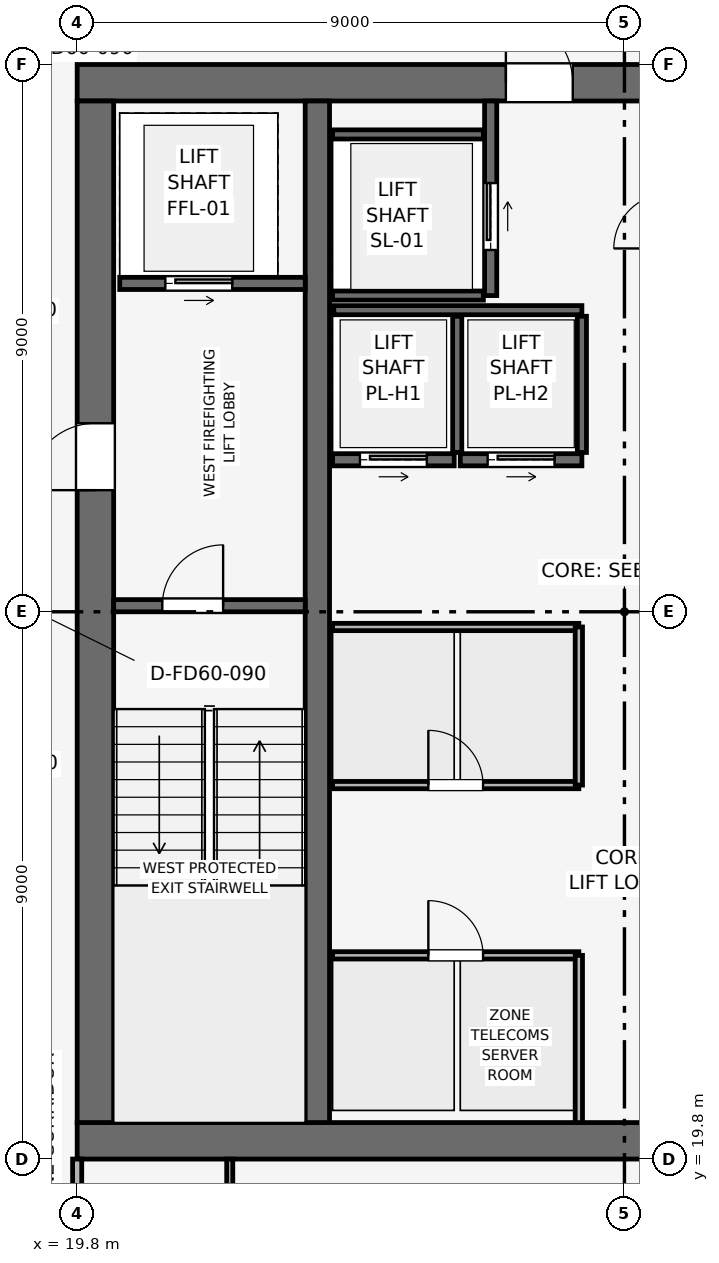
"""IFC4 building model, lengths in metres.
Left out: names, types, materials, properties, quantities, classifications, styles, units other than length and angle.
Written with IfcOpenShell. Run it as: python <this file> out.ifc"""

import sys

from ifc_helpers import new_model, si_unit, direction, frame, frame_2d, origin, place, context, subcontext, project, spatial, rectangle, extrude, element, fill, save


model = new_model("IFC4")
c1 = context("Model", 3, precision=1e-05, world=origin(), true_north=direction((0.0, 1.0)))
c2 = subcontext(c1, "Body", "Model", "MODEL_VIEW")
j1 = project(units=[si_unit("LENGTHUNIT", "METRE"), si_unit("PLANEANGLEUNIT", "RADIAN")], contexts=[c1])
p1 = place(None, origin())
s1 = spatial("IfcSite", under=j1, at=p1, CompositionType="ELEMENT")
p2 = place(p1, origin())
s2 = spatial("IfcBuilding", under=s1, at=p2, CompositionType="ELEMENT")
p3 = place(p2, frame((0.0, 0.0, 321.75)))
s3 = spatial("IfcBuildingStorey", under=s2, at=p3, CompositionType="ELEMENT", Elevation=321.75)
p4 = place(p3, frame((19.8, 20.1, 0.0), z_axis=(0.0, 0.0, 1.0), x_axis=(1.0, 0.0, 0.0)))
e1 = element("IfcWall", 1, at=p4, inside=s3, PredefinedType="SHEAR", context=c2, shape_type="SweptSolid", body=[
    extrude(rectangle(XDim=18.0, YDim=0.6, at=frame_2d((9.0, 0.0))), origin(), (0.0, 0.0, 1.0), 3.75),
])
p5 = place(p3, frame((19.8, 37.5, 0.0), z_axis=(0.0, 0.0, 1.0), x_axis=(1.0, 0.0, 0.0)))
e2 = element("IfcWall", 2, at=p5, inside=s3, PredefinedType="SHEAR", context=c2, shape_type="SweptSolid", body=[
    extrude(rectangle(XDim=18.0, YDim=0.6, at=frame_2d((9.0, 0.0))), origin(), (0.0, 0.0, 1.0), 3.75),
])
p6 = place(p5, frame((7.05, 0.0, 0.0)))
e3 = element("IfcOpeningElement", 3, at=p6, cuts=e2, PredefinedType="OPENING", context=c2, shape_type="SweptSolid", body=[
    extrude(rectangle(XDim=1.1, YDim=2.15, at=frame_2d((0.55, 1.075))), frame((0.0, 0.31, 0.0), z_axis=(0.0, -1.0, 0.0), x_axis=(1.0, 0.0, 0.0)), (0.0, 0.0, 1.0), 0.62),
])
p7 = place(p3, frame((20.1, 20.4, 0.0), z_axis=(0.0, 0.0, 1.0), x_axis=(0.0, 1.0, 0.0)))
e4 = element("IfcWall", 4, at=p7, inside=s3, PredefinedType="SHEAR", context=c2, shape_type="SweptSolid", body=[
    extrude(rectangle(XDim=16.8, YDim=0.6, at=frame_2d((8.4, 0.0))), origin(), (0.0, 0.0, 1.0), 3.75),
])
p8 = place(p7, frame((10.4, 0.0, 0.0)))
e5 = element("IfcOpeningElement", 5, at=p8, cuts=e4, PredefinedType="OPENING", context=c2, shape_type="SweptSolid", body=[
    extrude(rectangle(XDim=1.1, YDim=2.15, at=frame_2d((0.55, 1.075))), frame((0.0, 0.31, 0.0), z_axis=(0.0, -1.0, 0.0), x_axis=(1.0, 0.0, 0.0)), (0.0, 0.0, 1.0), 0.62),
])
p9 = place(p3, frame((23.75, 20.4, 0.0), z_axis=(0.0, 0.0, 1.0), x_axis=(0.0, 1.0, 0.0)))
e6 = element("IfcWall", 6, at=p9, inside=s3, PredefinedType="SHEAR", context=c2, shape_type="SweptSolid", body=[
    extrude(rectangle(XDim=16.8, YDim=0.4, at=frame_2d((8.4, 0.0))), origin(), (0.0, 0.0, 1.0), 3.75),
])
p10 = place(p3, frame((20.4, 28.9, 0.0), z_axis=(0.0, 0.0, 1.0), x_axis=(1.0, 0.0, 0.0)))
e7 = element("IfcWall", 7, at=p10, inside=s3, PredefinedType="SHEAR", context=c2, shape_type="SweptSolid", body=[
    extrude(rectangle(XDim=3.15, YDim=0.2, at=frame_2d((1.575, 0.0))), origin(), (0.0, 0.0, 1.0), 3.51),
])
p11 = place(p10, frame((0.8, 0.0, 0.0)))
e8 = element("IfcOpeningElement", 8, at=p11, cuts=e7, PredefinedType="OPENING", context=c2, shape_type="SweptSolid", body=[
    extrude(rectangle(XDim=1.0, YDim=2.1, at=frame_2d((0.5, 1.05))), frame((0.0, 0.11, 0.0), z_axis=(0.0, -1.0, 0.0), x_axis=(1.0, 0.0, 0.0)), (0.0, 0.0, 1.0), 0.22),
])
p12 = place(p3, frame((20.5, 34.2, 0.0), z_axis=(0.0, 0.0, 1.0), x_axis=(1.0, 0.0, 0.0)))
e9 = element("IfcWall", 9, at=p12, inside=s3, PredefinedType="SHEAR", context=c2, shape_type="SweptSolid", body=[
    extrude(rectangle(XDim=3.05, YDim=0.2, at=frame_2d((1.525, 0.0))), origin(), (0.0, 0.0, 1.0), 3.51),
])
p13 = place(p12, frame((0.75, 0.0, 0.0)))
e10 = element("IfcOpeningElement", 10, at=p13, cuts=e9, PredefinedType="OPENING", context=c2, shape_type="SweptSolid", body=[
    extrude(rectangle(XDim=1.1, YDim=2.15, at=frame_2d((0.55, 1.075))), frame((0.0, 0.11, 0.0), z_axis=(0.0, -1.0, 0.0), x_axis=(1.0, 0.0, 0.0)), (0.0, 0.0, 1.0), 0.22),
])
p14 = place(p3, frame((26.6, 34.0, 0.0), z_axis=(0.0, 0.0, 1.0), x_axis=(0.0, 1.0, 0.0)))
e11 = element("IfcWall", 11, at=p14, inside=s3, PredefinedType="SHEAR", context=c2, shape_type="SweptSolid", body=[
    extrude(rectangle(XDim=3.2, YDim=0.2, at=frame_2d((1.6, 0.0))), origin(), (0.0, 0.0, 1.0), 3.51),
])
p15 = place(p14, frame((0.75, 0.0, 0.0)))
e12 = element("IfcOpeningElement", 12, at=p15, cuts=e11, PredefinedType="OPENING", context=c2, shape_type="SweptSolid", body=[
    extrude(rectangle(XDim=1.1, YDim=2.15, at=frame_2d((0.55, 1.075))), frame((0.0, 0.11, 0.0), z_axis=(0.0, -1.0, 0.0), x_axis=(1.0, 0.0, 0.0)), (0.0, 0.0, 1.0), 0.22),
])
for number, where, z_axis, x_axis in (
    (13, (24.0, 34.0, 0.0), (0.0, 0.0, 1.0), (1.0, 0.0, 0.0)),
    (14, (24.0, 36.65, 0.0), (0.0, 0.0, 1.0), (1.0, 0.0, 0.0)),
):
    element("IfcWall", number, at=place(p3, frame(where, z_axis=z_axis, x_axis=x_axis)), inside=s3, PredefinedType="SHEAR", context=c2, shape_type="SweptSolid", body=[
        extrude(rectangle(XDim=2.48, YDim=0.15, at=frame_2d((1.24, 0.0))), origin(), (0.0, 0.0, 1.0), 3.51),
    ])
p16 = place(p3, frame((24.0, 31.3, 0.0), z_axis=(0.0, 0.0, 1.0), x_axis=(1.0, 0.0, 0.0)))
e15 = element("IfcWall", 15, at=p16, inside=s3, PredefinedType="SHEAR", context=c2, shape_type="SweptSolid", body=[
    extrude(rectangle(XDim=2.0, YDim=0.2, at=frame_2d((1.0, 0.0))), origin(), (0.0, 0.0, 1.0), 3.51),
])
p17 = place(p16, frame((0.45, 0.0, 0.0)))
e16 = element("IfcOpeningElement", 16, at=p17, cuts=e15, PredefinedType="OPENING", context=c2, shape_type="SweptSolid", body=[
    extrude(rectangle(XDim=1.1, YDim=2.15, at=frame_2d((0.55, 1.075))), frame((0.0, 0.11, 0.0), z_axis=(0.0, -1.0, 0.0), x_axis=(1.0, 0.0, 0.0)), (0.0, 0.0, 1.0), 0.22),
])
p18 = place(p3, frame((26.1, 31.3, 0.0), z_axis=(0.0, 0.0, 1.0), x_axis=(1.0, 0.0, 0.0)))
e17 = element("IfcWall", 17, at=p18, inside=s3, PredefinedType="SHEAR", context=c2, shape_type="SweptSolid", body=[
    extrude(rectangle(XDim=2.0, YDim=0.2, at=frame_2d((1.0, 0.0))), origin(), (0.0, 0.0, 1.0), 3.51),
])
p19 = place(p18, frame((0.45, 0.0, 0.0)))
e18 = element("IfcOpeningElement", 18, at=p19, cuts=e17, PredefinedType="OPENING", context=c2, shape_type="SweptSolid", body=[
    extrude(rectangle(XDim=1.1, YDim=2.15, at=frame_2d((0.55, 1.075))), frame((0.0, 0.11, 0.0), z_axis=(0.0, -1.0, 0.0), x_axis=(1.0, 0.0, 0.0)), (0.0, 0.0, 1.0), 0.22),
])
p20 = place(p3, frame((24.02, 33.76, 0.0), z_axis=(0.0, 0.0, 1.0), x_axis=(1.0, 0.0, 0.0)))
e19 = element("IfcWall", 19, at=p20, inside=s3, PredefinedType="SHEAR", context=c2, shape_type="SweptSolid", body=[
    extrude(rectangle(XDim=4.08, YDim=0.15, at=frame_2d((2.04, 0.0))), origin(), (0.0, 0.0, 1.0), 3.51),
])
for number, where, z_axis, x_axis in (
    (20, (26.05, 31.42, 0.0), (0.0, 0.0, 1.0), (0.0, 1.0, 0.0)),
    (21, (28.1, 31.42, 0.0), (0.0, 0.0, 1.0), (0.0, 1.0, 0.0)),
):
    element("IfcWall", number, at=place(p3, frame(where, z_axis=z_axis, x_axis=x_axis)), inside=s3, PredefinedType="SHEAR", context=c2, shape_type="SweptSolid", body=[
        extrude(rectangle(XDim=2.24, YDim=0.15, at=frame_2d((1.12, 0.0))), origin(), (0.0, 0.0, 1.0), 3.51),
    ])
p21 = place(p3, frame((24.0, 23.15, 0.0), z_axis=(0.0, 0.0, 1.0), x_axis=(1.0, 0.0, 0.0)))
e22 = element("IfcWall", 22, at=p21, inside=s3, PredefinedType="PARTITIONING", context=c2, shape_type="SweptSolid", body=[
    extrude(rectangle(XDim=4.05, YDim=0.12, at=frame_2d((2.025, 0.0))), origin(), (0.0, 0.0, 1.0), 3.51),
])
p22 = place(p21, frame((1.575, 0.0, 0.0)))
e23 = element("IfcOpeningElement", 23, at=p22, cuts=e22, PredefinedType="OPENING", context=c2, shape_type="SweptSolid", body=[
    extrude(rectangle(XDim=0.9, YDim=2.1, at=frame_2d((0.45, 1.05))), frame((0.0, 0.07, 0.0), z_axis=(0.0, -1.0, 0.0), x_axis=(1.0, 0.0, 0.0)), (0.0, 0.0, 1.0), 0.14),
])
p23 = place(p3, frame((28.05, 20.4, 0.0), z_axis=(0.0, 0.0, 1.0), x_axis=(0.0, 1.0, 0.0)))
e24 = element("IfcWall", 24, at=p23, inside=s3, PredefinedType="PARTITIONING", context=c2, shape_type="SweptSolid", body=[
    extrude(rectangle(XDim=2.75, YDim=0.12, at=frame_2d((1.375, 0.0))), origin(), (0.0, 0.0, 1.0), 3.51),
])
p24 = place(p3, frame((24.0, 25.95, 0.0), z_axis=(0.0, 0.0, 1.0), x_axis=(1.0, 0.0, 0.0)))
e25 = element("IfcWall", 25, at=p24, inside=s3, PredefinedType="PARTITIONING", context=c2, shape_type="SweptSolid", body=[
    extrude(rectangle(XDim=4.05, YDim=0.12, at=frame_2d((2.025, 0.0))), origin(), (0.0, 0.0, 1.0), 3.51),
])
p25 = place(p24, frame((1.575, 0.0, 0.0)))
e26 = element("IfcOpeningElement", 26, at=p25, cuts=e25, PredefinedType="OPENING", context=c2, shape_type="SweptSolid", body=[
    extrude(rectangle(XDim=0.9, YDim=2.1, at=frame_2d((0.45, 1.05))), frame((0.0, 0.07, 0.0), z_axis=(0.0, -1.0, 0.0), x_axis=(1.0, 0.0, 0.0)), (0.0, 0.0, 1.0), 0.14),
])
p26 = place(p3, frame((24.0, 28.55, 0.0), z_axis=(0.0, 0.0, 1.0), x_axis=(1.0, 0.0, 0.0)))
e27 = element("IfcWall", 27, at=p26, inside=s3, PredefinedType="PARTITIONING", context=c2, shape_type="SweptSolid", body=[
    extrude(rectangle(XDim=4.05, YDim=0.12, at=frame_2d((2.025, 0.0))), origin(), (0.0, 0.0, 1.0), 3.51),
])
p27 = place(p3, frame((28.05, 25.95, 0.0), z_axis=(0.0, 0.0, 1.0), x_axis=(0.0, 1.0, 0.0)))
e28 = element("IfcWall", 28, at=p27, inside=s3, PredefinedType="PARTITIONING", context=c2, shape_type="SweptSolid", body=[
    extrude(rectangle(XDim=2.6, YDim=0.12, at=frame_2d((1.3, 0.0))), origin(), (0.0, 0.0, 1.0), 3.51),
])
p28 = place(p3, frame((19.8, 6.13, 0.0), z_axis=(0.0, 0.0, 1.0), x_axis=(0.0, 1.0, 0.0)))
e29 = element("IfcWall", 29, at=p28, inside=s3, PredefinedType="PARTITIONING", context=c2, shape_type="SweptSolid", body=[
    extrude(rectangle(XDim=13.67, YDim=0.15, at=frame_2d((6.835, 0.0))), origin(), (0.0, 0.0, 1.0), 3.095),
])
p29 = place(p28, frame((9.47, 0.0, 0.0)))
e30 = element("IfcOpeningElement", 30, at=p29, cuts=e29, PredefinedType="OPENING", context=c2, shape_type="SweptSolid", body=[
    extrude(rectangle(XDim=0.9, YDim=2.1, at=frame_2d((0.45, 1.05))), frame((0.0, 0.085, 0.0), z_axis=(0.0, -1.0, 0.0), x_axis=(1.0, 0.0, 0.0)), (0.0, 0.0, 1.0), 0.17),
])
p30 = place(p3, frame((22.309, 6.13, 0.0), z_axis=(0.0, 0.0, 1.0), x_axis=(0.0, 1.0, 0.0)))
e31 = element("IfcWall", 31, at=p30, inside=s3, PredefinedType="MOVABLE", context=c2, shape_type="SweptSolid", body=[
    extrude(rectangle(XDim=13.67, YDim=0.1, at=frame_2d((6.835, 0.0))), origin(), (0.0, 0.0, 1.0), 3.135),
])
p31 = place(p30, frame((11.27, 0.0, 0.0)))
e32 = element("IfcOpeningElement", 32, at=p31, cuts=e31, PredefinedType="OPENING", context=c2, shape_type="SweptSolid", body=[
    extrude(rectangle(XDim=0.9, YDim=2.1, at=frame_2d((0.45, 1.05))), frame((0.0, 0.06, 0.0), z_axis=(0.0, -1.0, 0.0), x_axis=(1.0, 0.0, 0.0)), (0.0, 0.0, 1.0), 0.12),
])
p32 = place(p11, origin())
e33 = element("IfcDoor", 33, at=p32, inside=s3, OperationType="SINGLE_SWING_RIGHT", PredefinedType="DOOR", context=c2, shape_type="SweptSolid", body=[
    extrude(rectangle(XDim=1.0, YDim=2.1, at=frame_2d((0.5, 1.05))), frame((0.0, 0.025, 0.0), z_axis=(0.0, -1.0, 0.0), x_axis=(1.0, 0.0, 0.0)), (0.0, 0.0, 1.0), 0.05),
])
fill(e8, e33)
p33 = place(p13, origin())
e34 = element("IfcDoor", 34, at=p33, inside=s3, OperationType="SLIDING_TO_RIGHT", PredefinedType="DOOR", context=c2, shape_type="SweptSolid", body=[
    extrude(rectangle(XDim=1.1, YDim=2.15, at=frame_2d((0.55, 1.075))), frame((0.0, 0.025, 0.0), z_axis=(0.0, -1.0, 0.0), x_axis=(1.0, 0.0, 0.0)), (0.0, 0.0, 1.0), 0.05),
])
fill(e10, e34)
p34 = place(p15, origin())
e35 = element("IfcDoor", 35, at=p34, inside=s3, OperationType="SLIDING_TO_RIGHT", PredefinedType="DOOR", context=c2, shape_type="SweptSolid", body=[
    extrude(rectangle(XDim=1.1, YDim=2.15, at=frame_2d((0.55, 1.075))), frame((0.0, 0.025, 0.0), z_axis=(0.0, -1.0, 0.0), x_axis=(1.0, 0.0, 0.0)), (0.0, 0.0, 1.0), 0.05),
])
fill(e12, e35)
p35 = place(p17, origin())
e36 = element("IfcDoor", 36, at=p35, inside=s3, OperationType="SLIDING_TO_RIGHT", PredefinedType="DOOR", context=c2, shape_type="SweptSolid", body=[
    extrude(rectangle(XDim=1.1, YDim=2.15, at=frame_2d((0.55, 1.075))), frame((0.0, 0.025, 0.0), z_axis=(0.0, -1.0, 0.0), x_axis=(1.0, 0.0, 0.0)), (0.0, 0.0, 1.0), 0.05),
])
fill(e16, e36)
p36 = place(p19, origin())
e37 = element("IfcDoor", 37, at=p36, inside=s3, OperationType="SLIDING_TO_RIGHT", PredefinedType="DOOR", context=c2, shape_type="SweptSolid", body=[
    extrude(rectangle(XDim=1.1, YDim=2.15, at=frame_2d((0.55, 1.075))), frame((0.0, 0.025, 0.0), z_axis=(0.0, -1.0, 0.0), x_axis=(1.0, 0.0, 0.0)), (0.0, 0.0, 1.0), 0.05),
])
fill(e18, e37)
p37 = place(p22, origin())
e38 = element("IfcDoor", 38, at=p37, inside=s3, OperationType="SINGLE_SWING_LEFT", PredefinedType="DOOR", context=c2, shape_type="SweptSolid", body=[
    extrude(rectangle(XDim=0.9, YDim=2.1, at=frame_2d((0.45, 1.05))), frame((0.0, 0.025, 0.0), z_axis=(0.0, -1.0, 0.0), x_axis=(1.0, 0.0, 0.0)), (0.0, 0.0, 1.0), 0.05),
])
fill(e23, e38)
p38 = place(p25, origin())
e39 = element("IfcDoor", 39, at=p38, inside=s3, OperationType="SINGLE_SWING_LEFT", PredefinedType="DOOR", context=c2, shape_type="SweptSolid", body=[
    extrude(rectangle(XDim=0.9, YDim=2.1, at=frame_2d((0.45, 1.05))), frame((0.0, 0.025, 0.0), z_axis=(0.0, -1.0, 0.0), x_axis=(1.0, 0.0, 0.0)), (0.0, 0.0, 1.0), 0.05),
])
fill(e26, e39)
p39 = place(p8, origin())
e40 = element("IfcDoor", 40, at=p39, inside=s3, OperationType="SINGLE_SWING_LEFT", PredefinedType="DOOR", context=c2, shape_type="SweptSolid", body=[
    extrude(rectangle(XDim=1.1, YDim=2.15, at=frame_2d((0.55, 1.075))), frame((0.0, 0.025, 0.0), z_axis=(0.0, -1.0, 0.0), x_axis=(1.0, 0.0, 0.0)), (0.0, 0.0, 1.0), 0.05),
])
fill(e5, e40)
p40 = place(p6, origin())
e41 = element("IfcDoor", 41, at=p40, inside=s3, OperationType="SINGLE_SWING_LEFT", PredefinedType="DOOR", context=c2, shape_type="SweptSolid", body=[
    extrude(rectangle(XDim=1.1, YDim=2.15, at=frame_2d((0.55, 1.075))), frame((0.0, 0.025, 0.0), z_axis=(0.0, -1.0, 0.0), x_axis=(1.0, 0.0, 0.0)), (0.0, 0.0, 1.0), 0.05),
])
fill(e3, e41)
save(model, sys.argv[1])
